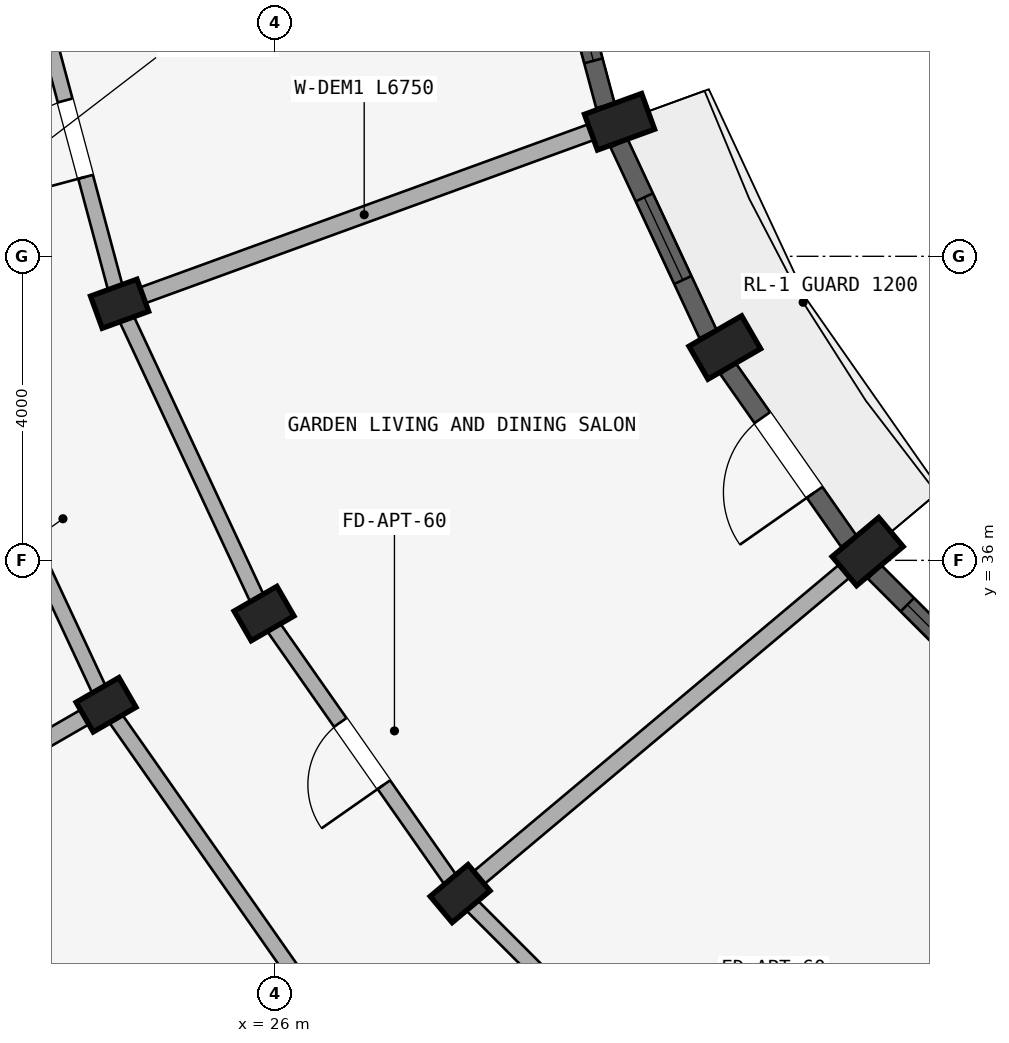
"""IFC4 building model, lengths in metres.
Left out: names, types, materials, properties, quantities, classifications, styles, units other than length and angle.
Written with IfcOpenShell. Run it as: python <this file> out.ifc"""

import sys

from ifc_helpers import new_model, si_unit, direction, frame, frame_2d, origin, origin_2d, place, context, subcontext, project, spatial, rectangle, extrude, element, fill, save


model = new_model("IFC4")
c1 = context("Model", 3, precision=1e-05, world=origin(), true_north=direction((0.0, 1.0)))
c2 = subcontext(c1, "Body", "Model", "MODEL_VIEW")
j1 = project(units=[si_unit("LENGTHUNIT", "METRE"), si_unit("PLANEANGLEUNIT", "RADIAN")], contexts=[c1])
p1 = place(None, origin())
s1 = spatial("IfcSite", under=j1, at=p1, CompositionType="ELEMENT")
p2 = place(p1, origin())
s2 = spatial("IfcBuilding", under=s1, at=p2, CompositionType="ELEMENT")
p3 = place(p2, frame((0.0, 0.0, 27.6)))
s3 = spatial("IfcBuildingStorey", under=s2, at=p3, CompositionType="ELEMENT", Elevation=27.6)
p4 = place(p3, frame((33.798, 36.115, 0.0), z_axis=(0.0, 0.0, 1.0), x_axis=(-0.642787609687, 0.766044443119, 0.0)))
e1 = element("IfcColumn", 1, at=p4, inside=s3, PredefinedType="COLUMN", context=c2, shape_type="SweptSolid", body=[
    extrude(rectangle(XDim=0.5, YDim=0.8, at=origin_2d()), origin(), (0.0, 0.0, 1.0), 2.93),
])
p5 = place(p3, frame((28.436, 31.616, 0.0), z_axis=(0.0, 0.0, 1.0), x_axis=(-0.642787609687, 0.766044443119, 0.0)))
e2 = element("IfcColumn", 2, at=p5, inside=s3, PredefinedType="COLUMN", context=c2, shape_type="SweptSolid", body=[
    extrude(rectangle(XDim=0.45, YDim=0.65, at=origin_2d()), origin(), (0.0, 0.0, 1.0), 2.93),
])
p6 = place(p3, frame((31.919, 38.8, 0.0), z_axis=(0.0, 0.0, 1.0), x_axis=(-0.5, 0.866025403784, 0.0)))
e3 = element("IfcColumn", 3, at=p6, inside=s3, PredefinedType="COLUMN", context=c2, shape_type="SweptSolid", body=[
    extrude(rectangle(XDim=0.5, YDim=0.8, at=origin_2d()), origin(), (0.0, 0.0, 1.0), 2.93),
])
for number, where, z_axis, x_axis in (
    (4, (25.856, 35.3, 0.0), (0.0, 0.0, 1.0), (-0.5, 0.866, 0.0)),
    (5, (23.778, 34.1, 0.0), (0.0, 0.0, 1.0), (-0.5, 0.866, 0.0)),
):
    element("IfcColumn", number, at=place(p3, frame(where, z_axis=z_axis, x_axis=x_axis)), inside=s3, PredefinedType="COLUMN", context=c2, shape_type="SweptSolid", body=[
        extrude(rectangle(XDim=0.45, YDim=0.65, at=origin_2d()), origin(), (0.0, 0.0, 1.0), 2.93),
    ])
p7 = place(p3, frame((30.534, 41.77, 0.0), z_axis=(0.0, 0.0, 1.0), x_axis=(-0.342020143326, 0.939692620786, 0.0)))
e6 = element("IfcColumn", 6, at=p7, inside=s3, PredefinedType="COLUMN", context=c2, shape_type="SweptSolid", body=[
    extrude(rectangle(XDim=0.5, YDim=0.8, at=origin_2d()), origin(), (0.0, 0.0, 1.0), 2.93),
])
p8 = place(p3, frame((23.956, 39.376, 0.0), z_axis=(0.0, 0.0, 1.0), x_axis=(-0.342020143326, 0.939692620786, 0.0)))
e7 = element("IfcColumn", 7, at=p8, inside=s3, PredefinedType="COLUMN", context=c2, shape_type="SweptSolid", body=[
    extrude(rectangle(XDim=0.45, YDim=0.65, at=origin_2d()), origin(), (0.0, 0.0, 1.0), 2.93),
])
p9 = place(p3, frame((31.616, 28.436, 0.0), z_axis=(0.0, 0.0, 1.0), x_axis=(-0.707106781187, 0.707106781187, 0.0)))
e8 = element("IfcWall", 8, at=p9, inside=s3, PredefinedType="STANDARD", context=c2, shape_type="SweptSolid", body=[
    extrude(rectangle(XDim=4.497, YDim=0.2, at=frame_2d((2.249, 0.0))), origin(), (0.0, 0.0, 1.0), 2.372),
])
p10 = place(p3, frame((28.436, 31.616, 0.0), z_axis=(0.0, 0.0, 1.0), x_axis=(-0.573571637217, 0.819155404658, 0.0)))
e9 = element("IfcWall", 9, at=p10, inside=s3, PredefinedType="STANDARD", context=c2, shape_type="SweptSolid", body=[
    extrude(rectangle(XDim=4.497, YDim=0.2, at=frame_2d((2.249, 0.0))), origin(), (0.0, 0.0, 1.0), 2.372),
])
p11 = place(p10, frame((1.749, 0.0, 0.0)))
e10 = element("IfcOpeningElement", 10, at=p11, cuts=e9, PredefinedType="OPENING", context=c2, shape_type="SweptSolid", body=[
    extrude(rectangle(XDim=1.0, YDim=2.15, at=frame_2d((0.5, 1.075))), frame((0.0, 0.11, 0.0), z_axis=(0.0, -1.0, 0.0), x_axis=(1.0, 0.0, 0.0)), (0.0, 0.0, 1.0), 0.22),
])
p12 = place(p3, frame((26.598, 30.073, 0.0), z_axis=(0.0, 0.0, 1.0), x_axis=(-0.573592335331, 0.819140911474, 0.0)))
e11 = element("IfcWall", 11, at=p12, inside=s3, PredefinedType="STANDARD", context=c2, shape_type="SweptSolid", body=[
    extrude(rectangle(XDim=4.916, YDim=0.2, at=frame_2d((2.458, 0.0))), origin(), (0.0, 0.0, 1.0), 2.372),
])
p13 = place(p3, frame((25.856, 35.3, 0.0), z_axis=(0.0, 0.0, 1.0), x_axis=(-0.422617978463, 0.906307919131, 0.0)))
e12 = element("IfcWall", 12, at=p13, inside=s3, PredefinedType="STANDARD", context=c2, shape_type="SweptSolid", body=[
    extrude(rectangle(XDim=4.497, YDim=0.2, at=frame_2d((2.249, 0.0))), origin(), (0.0, 0.0, 1.0), 2.372),
])
p14 = place(p3, frame((23.778, 34.1, 0.0), z_axis=(0.0, 0.0, 1.0), x_axis=(-0.422629854778, 0.906302381024, 0.0)))
e13 = element("IfcWall", 13, at=p14, inside=s3, PredefinedType="STANDARD", context=c2, shape_type="SweptSolid", body=[
    extrude(rectangle(XDim=4.915, YDim=0.2, at=frame_2d((2.458, 0.0))), origin(), (0.0, 0.0, 1.0), 2.372),
])
p15 = place(p14, frame((1.938, 0.0, 0.0)))
e14 = element("IfcOpeningElement", 14, at=p15, cuts=e13, PredefinedType="OPENING", context=c2, shape_type="SweptSolid", body=[
    extrude(rectangle(XDim=1.04, YDim=2.15, at=frame_2d((0.52, 1.075))), frame((0.0, 0.11, 0.0), z_axis=(0.0, -1.0, 0.0), x_axis=(1.0, 0.0, 0.0)), (0.0, 0.0, 1.0), 0.22),
])
p16 = place(p3, frame((23.956, 39.376, 0.0), z_axis=(0.0, 0.0, 1.0), x_axis=(-0.258787642463, 0.965934240054, 0.0)))
e15 = element("IfcWall", 15, at=p16, inside=s3, PredefinedType="STANDARD", context=c2, shape_type="SweptSolid", body=[
    extrude(rectangle(XDim=4.497, YDim=0.2, at=frame_2d((2.249, 0.0))), origin(), (0.0, 0.0, 1.0), 2.372),
])
p17 = place(p16, frame((1.729, 0.0, 0.0)))
e16 = element("IfcOpeningElement", 16, at=p17, cuts=e15, PredefinedType="OPENING", context=c2, shape_type="SweptSolid", body=[
    extrude(rectangle(XDim=1.04, YDim=2.15, at=frame_2d((0.52, 1.075))), frame((0.0, 0.11, 0.0), z_axis=(0.0, -1.0, 0.0), x_axis=(1.0, 0.0, 0.0)), (0.0, 0.0, 1.0), 0.22),
])
p18 = place(p3, frame((33.645, 35.987, 0.0), z_axis=(0.0, 0.0, 1.0), x_axis=(-0.766046761698, -0.642784846501, 0.0)))
e17 = element("IfcWall", 17, at=p18, inside=s3, PredefinedType="STANDARD", context=c2, shape_type="SweptSolid", body=[
    extrude(rectangle(XDim=6.75, YDim=0.22, at=frame_2d((3.375, 0.0))), origin(), (0.0, 0.0, 1.0), 2.372),
])
p19 = place(p3, frame((23.691, 34.05, 0.0), z_axis=(0.0, 0.0, 1.0), x_axis=(-0.866024222538, -0.500002045973, 0.0)))
e18 = element("IfcWall", 18, at=p19, inside=s3, PredefinedType="STANDARD", context=c2, shape_type="SweptSolid", body=[
    extrude(rectangle(XDim=9.02, YDim=0.22, at=frame_2d((4.51, 0.0))), origin(), (0.0, 0.0, 1.0), 2.372),
])
p20 = place(p3, frame((30.346, 41.702, 0.0), z_axis=(0.0, 0.0, 1.0), x_axis=(-0.939696231917, -0.342010221662, 0.0)))
e19 = element("IfcWall", 19, at=p20, inside=s3, PredefinedType="STANDARD", context=c2, shape_type="SweptSolid", body=[
    extrude(rectangle(XDim=6.75, YDim=0.22, at=frame_2d((3.375, 0.0))), origin(), (0.0, 0.0, 1.0), 2.372),
])
p21 = place(p3, frame((35.848, 33.889, 0.0), z_axis=(0.0, 0.0, 1.0), x_axis=(-0.707106781187, 0.707106781187, 0.0)))
e20 = element("IfcWall", 20, at=p21, inside=s3, PredefinedType="STANDARD", context=c2, shape_type="SweptSolid", body=[
    extrude(rectangle(XDim=2.77, YDim=0.25, at=frame_2d((1.385, 0.0))), origin(), (0.0, 0.0, 1.0), 2.472),
])
p22 = place(p21, frame((0.61, 0.0, 0.672)))
e21 = element("IfcOpeningElement", 21, at=p22, cuts=e20, PredefinedType="OPENING", context=c2, shape_type="SweptSolid", body=[
    extrude(rectangle(XDim=1.55, YDim=1.6, at=frame_2d((0.775, 0.8))), frame((0.0, 0.135, 0.0), z_axis=(0.0, -1.0, 0.0), x_axis=(1.0, 0.0, 0.0)), (0.0, 0.0, 1.0), 0.27),
])
p23 = place(p3, frame((33.551, 36.252, 0.0), z_axis=(0.0, 0.0, 1.0), x_axis=(-0.573633885053, 0.819111815273, 0.0)))
e22 = element("IfcWall", 22, at=p23, inside=s3, PredefinedType="STANDARD", context=c2, shape_type="SweptSolid", body=[
    extrude(rectangle(XDim=2.77, YDim=0.25, at=frame_2d((1.385, 0.0))), origin(), (0.0, 0.0, 1.0), 2.472),
])
p24 = place(p23, frame((0.785, 0.0, 0.0)))
e23 = element("IfcOpeningElement", 23, at=p24, cuts=e22, PredefinedType="OPENING", context=c2, shape_type="SweptSolid", body=[
    extrude(rectangle(XDim=1.2, YDim=2.15, at=frame_2d((0.6, 1.075))), frame((0.0, 0.135, 0.0), z_axis=(0.0, -1.0, 0.0), x_axis=(1.0, 0.0, 0.0)), (0.0, 0.0, 1.0), 0.27),
])
p25 = place(p3, frame((31.698, 38.977, 0.0), z_axis=(0.0, 0.0, 1.0), x_axis=(-0.422649007088, 0.906293449611, 0.0)))
e24 = element("IfcWall", 24, at=p25, inside=s3, PredefinedType="STANDARD", context=c2, shape_type="SweptSolid", body=[
    extrude(rectangle(XDim=2.77, YDim=0.25, at=frame_2d((1.385, 0.0))), origin(), (0.0, 0.0, 1.0), 2.472),
])
p26 = place(p25, frame((0.785, 0.0, 0.772)))
e25 = element("IfcOpeningElement", 25, at=p26, cuts=e24, PredefinedType="OPENING", context=c2, shape_type="SweptSolid", body=[
    extrude(rectangle(XDim=1.2, YDim=1.5, at=frame_2d((0.6, 0.75))), frame((0.0, 0.135, 0.0), z_axis=(0.0, -1.0, 0.0), x_axis=(1.0, 0.0, 0.0)), (0.0, 0.0, 1.0), 0.27),
])
p27 = place(p3, frame((30.347, 41.983, 0.0), z_axis=(0.0, 0.0, 1.0), x_axis=(-0.25878161084, 0.965935855992, 0.0)))
e26 = element("IfcWall", 26, at=p27, inside=s3, PredefinedType="STANDARD", context=c2, shape_type="SweptSolid", body=[
    extrude(rectangle(XDim=2.77, YDim=0.25, at=frame_2d((1.385, 0.0))), origin(), (0.0, 0.0, 1.0), 2.472),
])
p28 = place(p27, frame((0.61, 0.0, 0.672)))
e27 = element("IfcOpeningElement", 27, at=p28, cuts=e26, PredefinedType="OPENING", context=c2, shape_type="SweptSolid", body=[
    extrude(rectangle(XDim=1.55, YDim=1.6, at=frame_2d((0.775, 0.8))), frame((0.0, 0.135, 0.0), z_axis=(0.0, -1.0, 0.0), x_axis=(1.0, 0.0, 0.0)), (0.0, 0.0, 1.0), 0.27),
])
p29 = place(p22, origin())
e28 = element("IfcWindow", 28, at=p29, inside=s3, PartitioningType="DOUBLE_PANEL_VERTICAL", PredefinedType="WINDOW", context=c2, shape_type="SweptSolid", body=[
    extrude(rectangle(XDim=1.55, YDim=1.6, at=frame_2d((0.775, 0.8))), frame((0.0, 0.03, 0.0), z_axis=(0.0, -1.0, 0.0), x_axis=(1.0, 0.0, 0.0)), (0.0, 0.0, 1.0), 0.06),
])
fill(e21, e28)
p30 = place(p26, origin())
e29 = element("IfcWindow", 29, at=p30, inside=s3, PartitioningType="SINGLE_PANEL", PredefinedType="WINDOW", context=c2, shape_type="SweptSolid", body=[
    extrude(rectangle(XDim=1.2, YDim=1.5, at=frame_2d((0.6, 0.75))), frame((0.0, 0.03, 0.0), z_axis=(0.0, -1.0, 0.0), x_axis=(1.0, 0.0, 0.0)), (0.0, 0.0, 1.0), 0.06),
])
fill(e25, e29)
p31 = place(p28, origin())
e30 = element("IfcWindow", 30, at=p31, inside=s3, PartitioningType="DOUBLE_PANEL_VERTICAL", PredefinedType="WINDOW", context=c2, shape_type="SweptSolid", body=[
    extrude(rectangle(XDim=1.55, YDim=1.6, at=frame_2d((0.775, 0.8))), frame((0.0, 0.03, 0.0), z_axis=(0.0, -1.0, 0.0), x_axis=(1.0, 0.0, 0.0)), (0.0, 0.0, 1.0), 0.06),
])
fill(e27, e30)
p32 = place(p11, origin())
e31 = element("IfcDoor", 31, at=p32, inside=s3, OperationType="SINGLE_SWING_LEFT", PredefinedType="DOOR", context=c2, shape_type="SweptSolid", body=[
    extrude(rectangle(XDim=1.0, YDim=2.15, at=frame_2d((0.5, 1.075))), frame((0.0, 0.025, 0.0), z_axis=(0.0, -1.0, 0.0), x_axis=(1.0, 0.0, 0.0)), (0.0, 0.0, 1.0), 0.05),
])
fill(e10, e31)
p33 = place(p17, frame((1.04, 0.0, 0.0), z_axis=(0.0, 0.0, 1.0), x_axis=(-1.0, 0.0, 0.0)))
e32 = element("IfcDoor", 32, at=p33, inside=s3, OperationType="SINGLE_SWING_RIGHT", PredefinedType="DOOR", context=c2, shape_type="SweptSolid", body=[
    extrude(rectangle(XDim=1.04, YDim=2.15, at=frame_2d((0.52, 1.075))), frame((0.0, 0.025, 0.0), z_axis=(0.0, -1.0, 0.0), x_axis=(1.0, 0.0, 0.0)), (0.0, 0.0, 1.0), 0.05),
])
fill(e16, e32)
p34 = place(p24, frame((1.2, 0.0, 0.0), z_axis=(0.0, 0.0, 1.0), x_axis=(-1.0, 0.0, 0.0)))
e33 = element("IfcDoor", 33, at=p34, inside=s3, OperationType="SINGLE_SWING_RIGHT", PredefinedType="DOOR", context=c2, shape_type="SweptSolid", body=[
    extrude(rectangle(XDim=1.2, YDim=2.15, at=frame_2d((0.6, 1.075))), frame((0.0, 0.025, 0.0), z_axis=(0.0, -1.0, 0.0), x_axis=(1.0, 0.0, 0.0)), (0.0, 0.0, 1.0), 0.05),
])
fill(e23, e33)
save(model, sys.argv[1])
